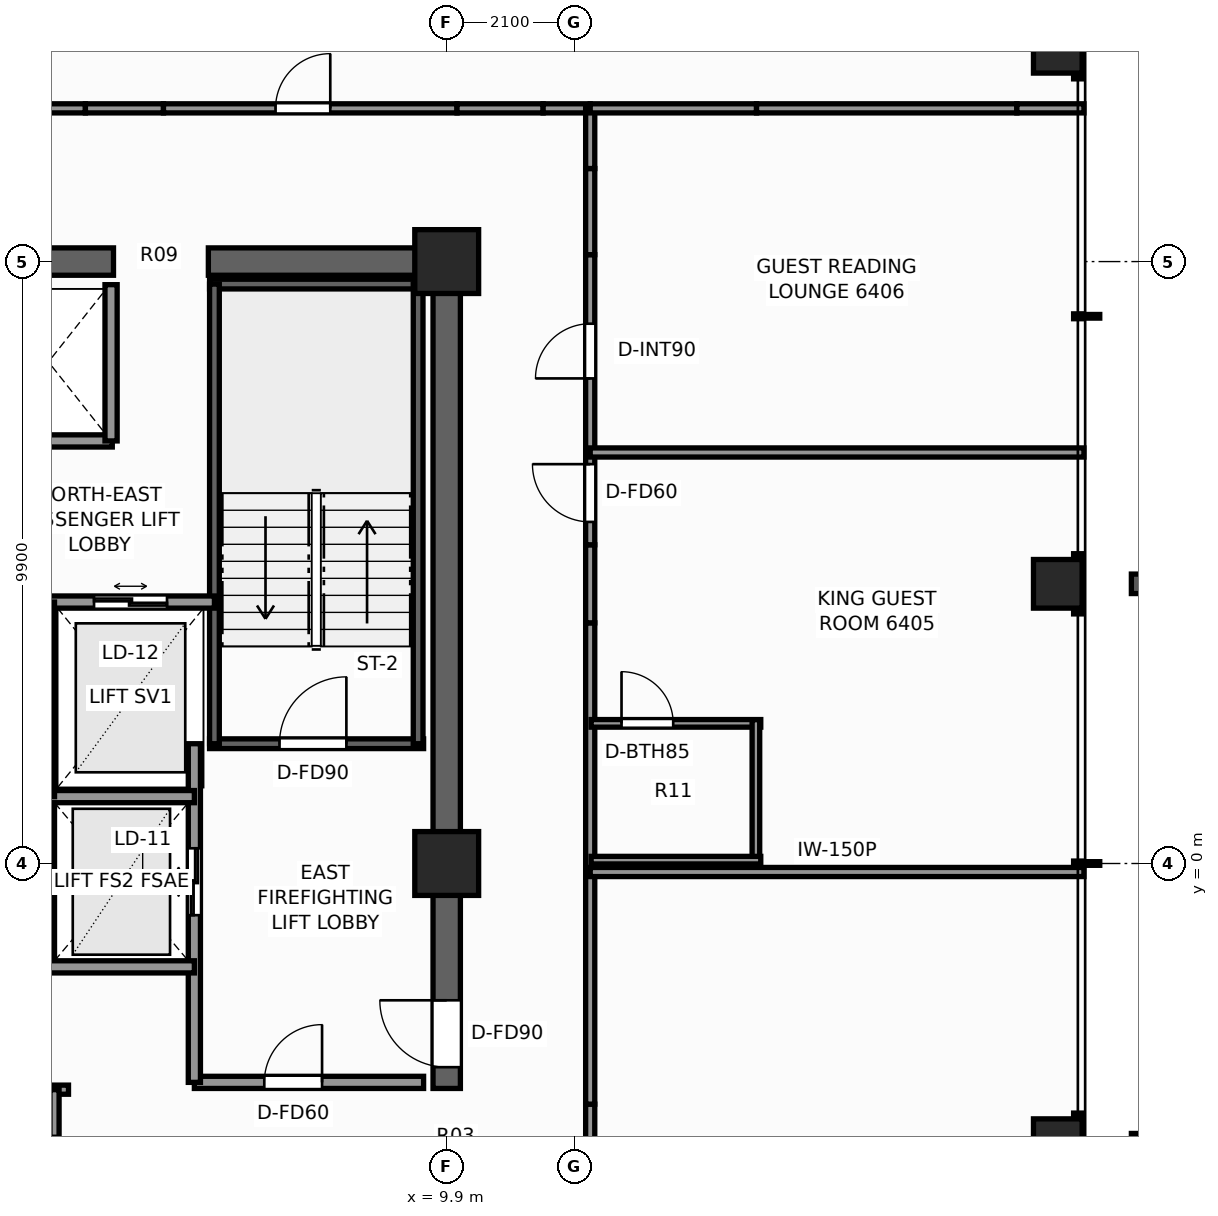
"""IFC4 building model, lengths in metres.
Left out: names, types, materials, properties, quantities, classifications, styles, units other than length and angle.
Written with IfcOpenShell. Run it as: python <this file> out.ifc"""

import sys

from ifc_helpers import new_model, si_unit, direction, frame, frame_2d, origin, origin_2d, place, context, subcontext, project, spatial, rectangle, extrude, element, fill, save


model = new_model("IFC4")
c1 = context("Model", 3, precision=1e-05, world=origin(), true_north=direction((0.0, 1.0)))
c2 = subcontext(c1, "Body", "Model", "MODEL_VIEW")
j1 = project(units=[si_unit("LENGTHUNIT", "METRE"), si_unit("PLANEANGLEUNIT", "RADIAN")], contexts=[c1])
p1 = place(None, origin())
s1 = spatial("IfcSite", under=j1, at=p1, CompositionType="ELEMENT")
p2 = place(p1, origin())
s2 = spatial("IfcBuilding", under=s1, at=p2, CompositionType="ELEMENT")
p3 = place(p2, frame((0.0, 0.0, 219.6)))
s3 = spatial("IfcBuildingStorey", under=s2, at=p3, CompositionType="ELEMENT", Elevation=219.6)
p4 = place(p3, frame((-10.125, 9.9, 0.0), z_axis=(0.0, 0.0, 1.0), x_axis=(1.0, 0.0, 0.0)))
e1 = element("IfcWall", 1, at=p4, inside=s3, PredefinedType="SHEAR", context=c2, shape_type="SweptSolid", body=[
    extrude(rectangle(XDim=14.545, YDim=0.45, at=frame_2d((7.272, 0.0))), origin(), (0.0, 0.0, 1.0), 3.3),
])
p5 = place(p3, frame((5.98, 9.9, 0.0), z_axis=(0.0, 0.0, 1.0), x_axis=(1.0, 0.0, 0.0)))
e2 = element("IfcWall", 2, at=p5, inside=s3, PredefinedType="SHEAR", context=c2, shape_type="SweptSolid", body=[
    extrude(rectangle(XDim=4.145, YDim=0.45, at=frame_2d((2.073, 0.0))), origin(), (0.0, 0.0, 1.0), 3.3),
])
p6 = place(p3, frame((9.9, -3.7, 0.0), z_axis=(0.0, 0.0, 1.0), x_axis=(0.0, 1.0, 0.0)))
e3 = element("IfcWall", 3, at=p6, inside=s3, PredefinedType="SHEAR", context=c2, shape_type="SweptSolid", body=[
    extrude(rectangle(XDim=13.375, YDim=0.45, at=frame_2d((6.688, 0.0))), origin(), (0.0, 0.0, 1.0), 3.3),
])
p7 = place(p6, frame((0.35, 0.0, 0.0)))
e4 = element("IfcOpeningElement", 4, at=p7, cuts=e3, PredefinedType="OPENING", context=c2, shape_type="SweptSolid", body=[
    extrude(rectangle(XDim=1.1, YDim=2.2, at=frame_2d((0.55, 1.1))), frame((0.0, 0.235, 0.0), z_axis=(0.0, -1.0, 0.0), x_axis=(1.0, 0.0, 0.0)), (0.0, 0.0, 1.0), 0.47),
])
for number, where, z_axis, x_axis in (
    (5, (9.9, 9.9, 0.0), (0.0, 0.0, 1.0), (1.0, 0.0, 0.0)),
    (6, (9.9, 0.0, 0.0), (0.0, 0.0, 1.0), (1.0, 0.0, 0.0)),
):
    element("IfcColumn", number, at=place(p3, frame(where, z_axis=z_axis, x_axis=x_axis)), inside=s3, PredefinedType="COLUMN", context=c2, shape_type="SweptSolid", body=[
        extrude(rectangle(XDim=1.05, YDim=1.05, at=origin_2d()), origin(), (0.0, 0.0, 1.0), 3.3),
    ])
for number, where, z_axis, x_axis in (
    (7, (19.95, -4.6, 0.0), (0.0, 0.0, 1.0), (1.0, 0.0, 0.0)),
    (8, (19.95, 4.6, 0.0), (0.0, 0.0, 1.0), (1.0, 0.0, 0.0)),
    (9, (19.95, 13.4, 0.0), (0.0, 0.0, 1.0), (1.0, 0.0, 0.0)),
):
    element("IfcColumn", number, at=place(p3, frame(where, z_axis=z_axis, x_axis=x_axis)), inside=s3, PredefinedType="COLUMN", context=c2, shape_type="SweptSolid", body=[
        extrude(rectangle(XDim=0.8, YDim=0.8, at=origin_2d()), origin(), (0.0, 0.0, 1.0), 3.3),
    ])
p8 = place(p3, frame((6.0, 1.97, 0.0), z_axis=(0.0, 0.0, 1.0), x_axis=(1.0, 0.0, 0.0)))
e10 = element("IfcWall", 10, at=p8, inside=s3, PredefinedType="SHEAR", context=c2, shape_type="SweptSolid", body=[
    extrude(rectangle(XDim=3.52, YDim=0.16, at=frame_2d((1.76, 0.0))), origin(), (0.0, 0.0, 1.0), 3.3),
])
p9 = place(p8, frame((1.15, 0.0, 0.0)))
e11 = element("IfcOpeningElement", 11, at=p9, cuts=e10, PredefinedType="OPENING", context=c2, shape_type="SweptSolid", body=[
    extrude(rectangle(XDim=1.1, YDim=2.2, at=frame_2d((0.55, 1.1))), frame((0.0, 0.09, 0.0), z_axis=(0.0, -1.0, 0.0), x_axis=(1.0, 0.0, 0.0)), (0.0, 0.0, 1.0), 0.18),
])
p10 = place(p3, frame((6.0, 9.53, 0.0), z_axis=(0.0, 0.0, 1.0), x_axis=(1.0, 0.0, 0.0)))
e12 = element("IfcWall", 12, at=p10, inside=s3, PredefinedType="SHEAR", context=c2, shape_type="SweptSolid", body=[
    extrude(rectangle(XDim=3.52, YDim=0.16, at=frame_2d((1.76, 0.0))), origin(), (0.0, 0.0, 1.0), 3.3),
])
for number, where, z_axis, x_axis in (
    (13, (6.08, 1.97, 0.0), (0.0, 0.0, 1.0), (0.0, 1.0, 0.0)),
    (14, (9.43, 1.97, 0.0), (0.0, 0.0, 1.0), (0.0, 1.0, 0.0)),
):
    element("IfcWall", number, at=place(p3, frame(where, z_axis=z_axis, x_axis=x_axis)), inside=s3, PredefinedType="SHEAR", context=c2, shape_type="SweptSolid", body=[
        extrude(rectangle(XDim=7.56, YDim=0.16, at=frame_2d((3.78, 0.0))), origin(), (0.0, 0.0, 1.0), 3.3),
    ])
p11 = place(p3, frame((5.75, -3.6, 0.0), z_axis=(0.0, 0.0, 1.0), x_axis=(1.0, 0.0, 0.0)))
e15 = element("IfcWall", 15, at=p11, inside=s3, PredefinedType="SOLIDWALL", context=c2, shape_type="SweptSolid", body=[
    extrude(rectangle(XDim=3.77, YDim=0.2, at=frame_2d((1.885, 0.0))), origin(), (0.0, 0.0, 1.0), 3.08),
])
p12 = place(p11, frame((1.15, 0.0, 0.0)))
e16 = element("IfcOpeningElement", 16, at=p12, cuts=e15, PredefinedType="OPENING", context=c2, shape_type="SweptSolid", body=[
    extrude(rectangle(XDim=0.95, YDim=2.06, at=frame_2d((0.475, 1.03))), frame((0.0, 0.11, 0.0), z_axis=(0.0, -1.0, 0.0), x_axis=(1.0, 0.0, 0.0)), (0.0, 0.0, 1.0), 0.22),
])
p13 = place(p3, frame((5.75, -3.6, 0.0), z_axis=(0.0, 0.0, 1.0), x_axis=(0.0, 1.0, 0.0)))
e17 = element("IfcWall", 17, at=p13, inside=s3, PredefinedType="SOLIDWALL", context=c2, shape_type="SweptSolid", body=[
    extrude(rectangle(XDim=5.57, YDim=0.2, at=frame_2d((2.785, 0.0))), origin(), (0.0, 0.0, 1.0), 3.08),
])
p14 = place(p13, frame((2.75, 0.0, 0.0)))
e18 = element("IfcOpeningElement", 18, at=p14, cuts=e17, PredefinedType="OPENING", context=c2, shape_type="SweptSolid", body=[
    extrude(rectangle(XDim=1.1, YDim=2.2, at=frame_2d((0.55, 1.1))), frame((0.0, 0.11, 0.0), z_axis=(0.0, -1.0, 0.0), x_axis=(1.0, 0.0, 0.0)), (0.0, 0.0, 1.0), 0.22),
])
p15 = place(p3, frame((3.35, -1.7, 0.0), z_axis=(0.0, 0.0, 1.0), x_axis=(0.0, 1.0, 0.0)))
e19 = element("IfcWall", 19, at=p15, inside=s3, PredefinedType="SOLIDWALL", context=c2, shape_type="SweptSolid", body=[
    extrude(rectangle(XDim=2.8, YDim=0.2, at=frame_2d((1.4, 0.0))), origin(), (0.0, 0.0, 1.0), 3.08),
])
for number, where, z_axis, x_axis in (
    (20, (3.35, -1.7, 0.0), (0.0, 0.0, 1.0), (1.0, 0.0, 0.0)),
    (21, (3.35, 1.1, 0.0), (0.0, 0.0, 1.0), (1.0, 0.0, 0.0)),
):
    element("IfcWall", number, at=place(p3, frame(where, z_axis=z_axis, x_axis=x_axis)), inside=s3, PredefinedType="SOLIDWALL", context=c2, shape_type="SweptSolid", body=[
        extrude(rectangle(XDim=2.4, YDim=0.2, at=frame_2d((1.2, 0.0))), origin(), (0.0, 0.0, 1.0), 3.08),
    ])
p16 = place(p3, frame((3.35, 4.3, 0.0), z_axis=(0.0, 0.0, 1.0), x_axis=(1.0, 0.0, 0.0)))
e22 = element("IfcWall", 22, at=p16, inside=s3, PredefinedType="SOLIDWALL", context=c2, shape_type="SweptSolid", body=[
    extrude(rectangle(XDim=2.73, YDim=0.2, at=frame_2d((1.365, 0.0))), origin(), (0.0, 0.0, 1.0), 3.08),
])
p17 = place(p16, frame((0.75, 0.0, 0.0)))
e23 = element("IfcOpeningElement", 23, at=p17, cuts=e22, PredefinedType="OPENING", context=c2, shape_type="SweptSolid", body=[
    extrude(rectangle(XDim=1.2, YDim=2.25, at=frame_2d((0.6, 1.125))), frame((0.0, 0.11, 0.0), z_axis=(0.0, -1.0, 0.0), x_axis=(1.0, 0.0, 0.0)), (0.0, 0.0, 1.0), 0.22),
])
p18 = place(p3, frame((0.22, 6.95, 0.0), z_axis=(0.0, 0.0, 1.0), x_axis=(1.0, 0.0, 0.0)))
e24 = element("IfcWall", 24, at=p18, inside=s3, PredefinedType="SOLIDWALL", context=c2, shape_type="SweptSolid", body=[
    extrude(rectangle(XDim=4.18, YDim=0.2, at=frame_2d((2.09, 0.0))), origin(), (0.0, 0.0, 1.0), 3.08),
])
p19 = place(p3, frame((4.38, 6.95, 0.0), z_axis=(0.0, 0.0, 1.0), x_axis=(0.0, 1.0, 0.0)))
e25 = element("IfcWall", 25, at=p19, inside=s3, PredefinedType="SOLIDWALL", context=c2, shape_type="SweptSolid", body=[
    extrude(rectangle(XDim=2.57, YDim=0.2, at=frame_2d((1.285, 0.0))), origin(), (0.0, 0.0, 1.0), 3.08),
])
p20 = place(p3, frame((3.35, 1.1, 0.0), z_axis=(0.0, 0.0, 1.0), x_axis=(0.0, 1.0, 0.0)))
e26 = element("IfcWall", 26, at=p20, inside=s3, PredefinedType="SOLIDWALL", context=c2, shape_type="SweptSolid", body=[
    extrude(rectangle(XDim=3.2, YDim=0.2, at=frame_2d((1.6, 0.0))), origin(), (0.0, 0.0, 1.0), 3.08),
])
p21 = place(p3, frame((-3.68, -3.72, 0.0), z_axis=(0.0, 0.0, 1.0), x_axis=(1.0, 0.0, 0.0)))
e27 = element("IfcWall", 27, at=p21, inside=s3, PredefinedType="PARTITIONING", context=c2, shape_type="SweptSolid", body=[
    extrude(rectangle(XDim=7.36, YDim=0.15, at=frame_2d((3.68, 0.0))), origin(), (0.0, 0.0, 1.0), 3.08),
])
p22 = place(p3, frame((3.45, -6.08, 0.0), z_axis=(0.0, 0.0, 1.0), x_axis=(0.0, 1.0, 0.0)))
e28 = element("IfcWall", 28, at=p22, inside=s3, PredefinedType="PARTITIONING", context=c2, shape_type="SweptSolid", body=[
    extrude(rectangle(XDim=2.36, YDim=0.15, at=frame_2d((1.18, 0.0))), origin(), (0.0, 0.0, 1.0), 3.08),
])
p23 = place(p22, frame((0.65, 0.0, 0.0)))
e29 = element("IfcOpeningElement", 29, at=p23, cuts=e28, PredefinedType="OPENING", context=c2, shape_type="SweptSolid", body=[
    extrude(rectangle(XDim=0.95, YDim=2.06, at=frame_2d((0.475, 1.03))), frame((0.0, 0.085, 0.0), z_axis=(0.0, -1.0, 0.0), x_axis=(1.0, 0.0, 0.0)), (0.0, 0.0, 1.0), 0.17),
])
p24 = place(p3, frame((-3.958, 12.42, 0.0), z_axis=(0.0, 0.0, 1.0), x_axis=(1.0, 0.0, 0.0)))
e30 = element("IfcWall", 30, at=p24, inside=s3, PredefinedType="PARTITIONING", context=c2, shape_type="SweptSolid", body=[
    extrude(rectangle(XDim=7.916, YDim=0.15, at=frame_2d((3.958, 0.0))), origin(), (0.0, 0.0, 1.0), 2.605),
])
p25 = place(p3, frame((3.958, 12.42, 0.0), z_axis=(0.0, 0.0, 1.0), x_axis=(1.0, 0.0, 0.0)))
e31 = element("IfcWall", 31, at=p25, inside=s3, PredefinedType="PARTITIONING", context=c2, shape_type="SweptSolid", body=[
    extrude(rectangle(XDim=1.284, YDim=0.15, at=frame_2d((0.642, 0.0))), origin(), (0.0, 0.0, 1.0), 1.265),
])
p26 = place(p3, frame((5.242, 12.42, 0.0), z_axis=(0.0, 0.0, 1.0), x_axis=(1.0, 0.0, 0.0)))
e32 = element("IfcWall", 32, at=p26, inside=s3, PredefinedType="PARTITIONING", context=c2, shape_type="SweptSolid", body=[
    extrude(rectangle(XDim=4.827, YDim=0.15, at=frame_2d((2.414, 0.0))), origin(), (0.0, 0.0, 1.0), 3.08),
])
p27 = place(p26, frame((1.843, 0.0, 0.0)))
e33 = element("IfcOpeningElement", 33, at=p27, cuts=e32, PredefinedType="OPENING", context=c2, shape_type="SweptSolid", body=[
    extrude(rectangle(XDim=0.9, YDim=2.06, at=frame_2d((0.45, 1.03))), frame((0.0, 0.085, 0.0), z_axis=(0.0, -1.0, 0.0), x_axis=(1.0, 0.0, 0.0)), (0.0, 0.0, 1.0), 0.17),
])
p28 = place(p3, frame((10.069, 12.42, 0.0), z_axis=(0.0, 0.0, 1.0), x_axis=(1.0, 0.0, 0.0)))
e34 = element("IfcWall", 34, at=p28, inside=s3, PredefinedType="PARTITIONING", context=c2, shape_type="SweptSolid", body=[
    extrude(rectangle(XDim=1.417, YDim=0.15, at=frame_2d((0.708, 0.0))), origin(), (0.0, 0.0, 1.0), 1.265),
])
p29 = place(p3, frame((11.486, 12.42, 0.0), z_axis=(0.0, 0.0, 1.0), x_axis=(1.0, 0.0, 0.0)))
e35 = element("IfcWall", 35, at=p29, inside=s3, PredefinedType="PARTITIONING", context=c2, shape_type="SweptSolid", body=[
    extrude(rectangle(XDim=0.774, YDim=0.15, at=frame_2d((0.387, 0.0))), origin(), (0.0, 0.0, 1.0), 3.08),
])
p30 = place(p3, frame((12.26, -5.242, 0.0), z_axis=(0.0, 0.0, 1.0), x_axis=(0.0, 1.0, 0.0)))
e36 = element("IfcWall", 36, at=p30, inside=s3, PredefinedType="PARTITIONING", context=c2, shape_type="SweptSolid", body=[
    extrude(rectangle(XDim=1.284, YDim=0.15, at=frame_2d((0.642, 0.0))), origin(), (0.0, 0.0, 1.0), 1.265),
])
p31 = place(p3, frame((12.26, -3.958, 0.0), z_axis=(0.0, 0.0, 1.0), x_axis=(0.0, 1.0, 0.0)))
e37 = element("IfcWall", 37, at=p31, inside=s3, PredefinedType="PARTITIONING", context=c2, shape_type="SweptSolid", body=[
    extrude(rectangle(XDim=7.916, YDim=0.15, at=frame_2d((3.958, 0.0))), origin(), (0.0, 0.0, 1.0), 2.369),
])
p32 = place(p3, frame((12.26, 3.958, 0.0), z_axis=(0.0, 0.0, 1.0), x_axis=(0.0, 1.0, 0.0)))
e38 = element("IfcWall", 38, at=p32, inside=s3, PredefinedType="PARTITIONING", context=c2, shape_type="SweptSolid", body=[
    extrude(rectangle(XDim=1.284, YDim=0.15, at=frame_2d((0.642, 0.0))), origin(), (0.0, 0.0, 1.0), 1.265),
])
p33 = place(p3, frame((12.26, 5.242, 0.0), z_axis=(0.0, 0.0, 1.0), x_axis=(0.0, 1.0, 0.0)))
e39 = element("IfcWall", 39, at=p33, inside=s3, PredefinedType="PARTITIONING", context=c2, shape_type="SweptSolid", body=[
    extrude(rectangle(XDim=4.772, YDim=0.15, at=frame_2d((2.386, 0.0))), origin(), (0.0, 0.0, 1.0), 3.08),
])
p34 = place(p33, frame((0.376, 0.0, 0.0)))
e40 = element("IfcOpeningElement", 40, at=p34, cuts=e39, PredefinedType="OPENING", context=c2, shape_type="SweptSolid", body=[
    extrude(rectangle(XDim=0.95, YDim=2.06, at=frame_2d((0.475, 1.03))), frame((0.0, 0.085, 0.0), z_axis=(0.0, -1.0, 0.0), x_axis=(1.0, 0.0, 0.0)), (0.0, 0.0, 1.0), 0.17),
])
p35 = place(p33, frame((2.736, 0.0, 0.0)))
e41 = element("IfcOpeningElement", 41, at=p35, cuts=e39, PredefinedType="OPENING", context=c2, shape_type="SweptSolid", body=[
    extrude(rectangle(XDim=0.9, YDim=2.06, at=frame_2d((0.45, 1.03))), frame((0.0, 0.085, 0.0), z_axis=(0.0, -1.0, 0.0), x_axis=(1.0, 0.0, 0.0)), (0.0, 0.0, 1.0), 0.17),
])
p36 = place(p3, frame((12.26, 10.014, 0.0), z_axis=(0.0, 0.0, 1.0), x_axis=(0.0, 1.0, 0.0)))
e42 = element("IfcWall", 42, at=p36, inside=s3, PredefinedType="PARTITIONING", context=c2, shape_type="SweptSolid", body=[
    extrude(rectangle(XDim=1.417, YDim=0.15, at=frame_2d((0.708, 0.0))), origin(), (0.0, 0.0, 1.0), 1.265),
])
p37 = place(p3, frame((12.26, 11.43, 0.0), z_axis=(0.0, 0.0, 1.0), x_axis=(0.0, 1.0, 0.0)))
e43 = element("IfcWall", 43, at=p37, inside=s3, PredefinedType="PARTITIONING", context=c2, shape_type="SweptSolid", body=[
    extrude(rectangle(XDim=0.99, YDim=0.15, at=frame_2d((0.495, 0.0))), origin(), (0.0, 0.0, 1.0), 3.08),
])
p38 = place(p3, frame((12.26, 12.42, 0.0), z_axis=(0.0, 0.0, 1.0), x_axis=(1.0, 0.0, 0.0)))
e44 = element("IfcWall", 44, at=p38, inside=s3, PredefinedType="PARTITIONING", context=c2, shape_type="SweptSolid", body=[
    extrude(rectangle(XDim=2.735, YDim=0.15, at=frame_2d((1.368, 0.0))), origin(), (0.0, 0.0, 1.0), 3.08),
])
p39 = place(p3, frame((14.995, 12.42, 0.0), z_axis=(0.0, 0.0, 1.0), x_axis=(1.0, 0.0, 0.0)))
e45 = element("IfcWall", 45, at=p39, inside=s3, PredefinedType="PARTITIONING", context=c2, shape_type="SweptSolid", body=[
    extrude(rectangle(XDim=4.281, YDim=0.15, at=frame_2d((2.141, 0.0))), origin(), (0.0, 0.0, 1.0), 1.265),
])
p40 = place(p3, frame((19.277, 12.42, 0.0), z_axis=(0.0, 0.0, 1.0), x_axis=(1.0, 0.0, 0.0)))
e46 = element("IfcWall", 46, at=p40, inside=s3, PredefinedType="PARTITIONING", context=c2, shape_type="SweptSolid", body=[
    extrude(rectangle(XDim=1.103, YDim=0.15, at=frame_2d((0.552, 0.0))), origin(), (0.0, 0.0, 1.0), 2.453),
])
for number, where, z_axis, x_axis in (
    (47, (12.26, -0.14, 0.0), (0.0, 0.0, 1.0), (1.0, 0.0, 0.0)),
    (48, (12.26, 6.76, 0.0), (0.0, 0.0, 1.0), (1.0, 0.0, 0.0)),
):
    element("IfcWall", number, at=place(p3, frame(where, z_axis=z_axis, x_axis=x_axis)), inside=s3, PredefinedType="PARTITIONING", context=c2, shape_type="SweptSolid", body=[
        extrude(rectangle(XDim=8.12, YDim=0.15, at=frame_2d((4.06, 0.0))), origin(), (0.0, 0.0, 1.0), 2.453),
    ])
p41 = place(p3, frame((12.275, 2.305, 0.0), z_axis=(0.0, 0.0, 1.0), x_axis=(1.0, 0.0, 0.0)))
e49 = element("IfcWall", 49, at=p41, inside=s3, PredefinedType="PARTITIONING", context=c2, shape_type="SweptSolid", body=[
    extrude(rectangle(XDim=2.79, YDim=0.125, at=frame_2d((1.395, 0.0))), origin(), (0.0, 0.0, 1.0), 3.08),
])
p42 = place(p41, frame((0.5, 0.0, 0.0)))
e50 = element("IfcOpeningElement", 50, at=p42, cuts=e49, PredefinedType="OPENING", context=c2, shape_type="SweptSolid", body=[
    extrude(rectangle(XDim=0.85, YDim=2.03, at=frame_2d((0.425, 1.015))), frame((0.0, 0.073, 0.0), z_axis=(0.0, -1.0, 0.0), x_axis=(1.0, 0.0, 0.0)), (0.0, 0.0, 1.0), 0.145),
])
p43 = place(p3, frame((14.985, -0.005, 0.0), z_axis=(0.0, 0.0, 1.0), x_axis=(0.0, 1.0, 0.0)))
e51 = element("IfcWall", 51, at=p43, inside=s3, PredefinedType="PARTITIONING", context=c2, shape_type="SweptSolid", body=[
    extrude(rectangle(XDim=2.37, YDim=0.125, at=frame_2d((1.185, 0.0))), origin(), (0.0, 0.0, 1.0), 2.605),
])
p44 = place(p3, frame((12.275, 0.055, 0.0), z_axis=(0.0, 0.0, 1.0), x_axis=(1.0, 0.0, 0.0)))
e52 = element("IfcWall", 52, at=p44, inside=s3, PredefinedType="PARTITIONING", context=c2, shape_type="SweptSolid", body=[
    extrude(rectangle(XDim=2.79, YDim=0.125, at=frame_2d((1.395, 0.0))), origin(), (0.0, 0.0, 1.0), 2.605),
])
p45 = place(p9, origin())
e53 = element("IfcDoor", 53, at=p45, inside=s3, OperationType="SINGLE_SWING_RIGHT", PredefinedType="DOOR", context=c2, shape_type="SweptSolid", body=[
    extrude(rectangle(XDim=1.1, YDim=2.2, at=frame_2d((0.55, 1.1))), frame((0.0, 0.025, 0.0), z_axis=(0.0, -1.0, 0.0), x_axis=(1.0, 0.0, 0.0)), (0.0, 0.0, 1.0), 0.05),
])
fill(e11, e53)
p46 = place(p7, origin())
e54 = element("IfcDoor", 54, at=p46, inside=s3, OperationType="SINGLE_SWING_RIGHT", PredefinedType="DOOR", context=c2, shape_type="SweptSolid", body=[
    extrude(rectangle(XDim=1.1, YDim=2.2, at=frame_2d((0.55, 1.1))), frame((0.0, 0.025, 0.0), z_axis=(0.0, -1.0, 0.0), x_axis=(1.0, 0.0, 0.0)), (0.0, 0.0, 1.0), 0.05),
])
fill(e4, e54)
p47 = place(p14, origin())
e55 = element("IfcDoor", 55, at=p47, inside=s3, OperationType="DOUBLE_DOOR_SLIDING", PredefinedType="DOOR", context=c2, shape_type="SweptSolid", body=[
    extrude(rectangle(XDim=1.1, YDim=2.2, at=frame_2d((0.55, 1.1))), frame((0.0, 0.025, 0.0), z_axis=(0.0, -1.0, 0.0), x_axis=(1.0, 0.0, 0.0)), (0.0, 0.0, 1.0), 0.05),
])
fill(e18, e55)
p48 = place(p17, origin())
e56 = element("IfcDoor", 56, at=p48, inside=s3, OperationType="DOUBLE_DOOR_SLIDING", PredefinedType="DOOR", context=c2, shape_type="SweptSolid", body=[
    extrude(rectangle(XDim=1.2, YDim=2.25, at=frame_2d((0.6, 1.125))), frame((0.0, 0.025, 0.0), z_axis=(0.0, -1.0, 0.0), x_axis=(1.0, 0.0, 0.0)), (0.0, 0.0, 1.0), 0.05),
])
fill(e23, e56)
p49 = place(p12, origin())
e57 = element("IfcDoor", 57, at=p49, inside=s3, OperationType="SINGLE_SWING_RIGHT", PredefinedType="DOOR", context=c2, shape_type="SweptSolid", body=[
    extrude(rectangle(XDim=0.95, YDim=2.06, at=frame_2d((0.475, 1.03))), frame((0.0, 0.025, 0.0), z_axis=(0.0, -1.0, 0.0), x_axis=(1.0, 0.0, 0.0)), (0.0, 0.0, 1.0), 0.05),
])
fill(e16, e57)
p50 = place(p23, origin())
e58 = element("IfcDoor", 58, at=p50, inside=s3, OperationType="SINGLE_SWING_LEFT", PredefinedType="DOOR", context=c2, shape_type="SweptSolid", body=[
    extrude(rectangle(XDim=0.95, YDim=2.06, at=frame_2d((0.475, 1.03))), frame((0.0, 0.025, 0.0), z_axis=(0.0, -1.0, 0.0), x_axis=(1.0, 0.0, 0.0)), (0.0, 0.0, 1.0), 0.05),
])
fill(e29, e58)
p51 = place(p42, origin())
e59 = element("IfcDoor", 59, at=p51, inside=s3, OperationType="SINGLE_SWING_LEFT", PredefinedType="DOOR", context=c2, shape_type="SweptSolid", body=[
    extrude(rectangle(XDim=0.85, YDim=2.03, at=frame_2d((0.425, 1.015))), frame((0.0, 0.025, 0.0), z_axis=(0.0, -1.0, 0.0), x_axis=(1.0, 0.0, 0.0)), (0.0, 0.0, 1.0), 0.05),
])
fill(e50, e59)
p52 = place(p34, origin())
e60 = element("IfcDoor", 60, at=p52, inside=s3, OperationType="SINGLE_SWING_RIGHT", PredefinedType="DOOR", context=c2, shape_type="SweptSolid", body=[
    extrude(rectangle(XDim=0.95, YDim=2.06, at=frame_2d((0.475, 1.03))), frame((0.0, 0.025, 0.0), z_axis=(0.0, -1.0, 0.0), x_axis=(1.0, 0.0, 0.0)), (0.0, 0.0, 1.0), 0.05),
])
fill(e40, e60)
p53 = place(p35, origin())
e61 = element("IfcDoor", 61, at=p53, inside=s3, OperationType="SINGLE_SWING_LEFT", PredefinedType="DOOR", context=c2, shape_type="SweptSolid", body=[
    extrude(rectangle(XDim=0.9, YDim=2.06, at=frame_2d((0.45, 1.03))), frame((0.0, 0.025, 0.0), z_axis=(0.0, -1.0, 0.0), x_axis=(1.0, 0.0, 0.0)), (0.0, 0.0, 1.0), 0.05),
])
fill(e41, e61)
p54 = place(p27, origin())
e62 = element("IfcDoor", 62, at=p54, inside=s3, OperationType="SINGLE_SWING_RIGHT", PredefinedType="DOOR", context=c2, shape_type="SweptSolid", body=[
    extrude(rectangle(XDim=0.9, YDim=2.06, at=frame_2d((0.45, 1.03))), frame((0.0, 0.025, 0.0), z_axis=(0.0, -1.0, 0.0), x_axis=(1.0, 0.0, 0.0)), (0.0, 0.0, 1.0), 0.05),
])
fill(e33, e62)
save(model, sys.argv[1])
